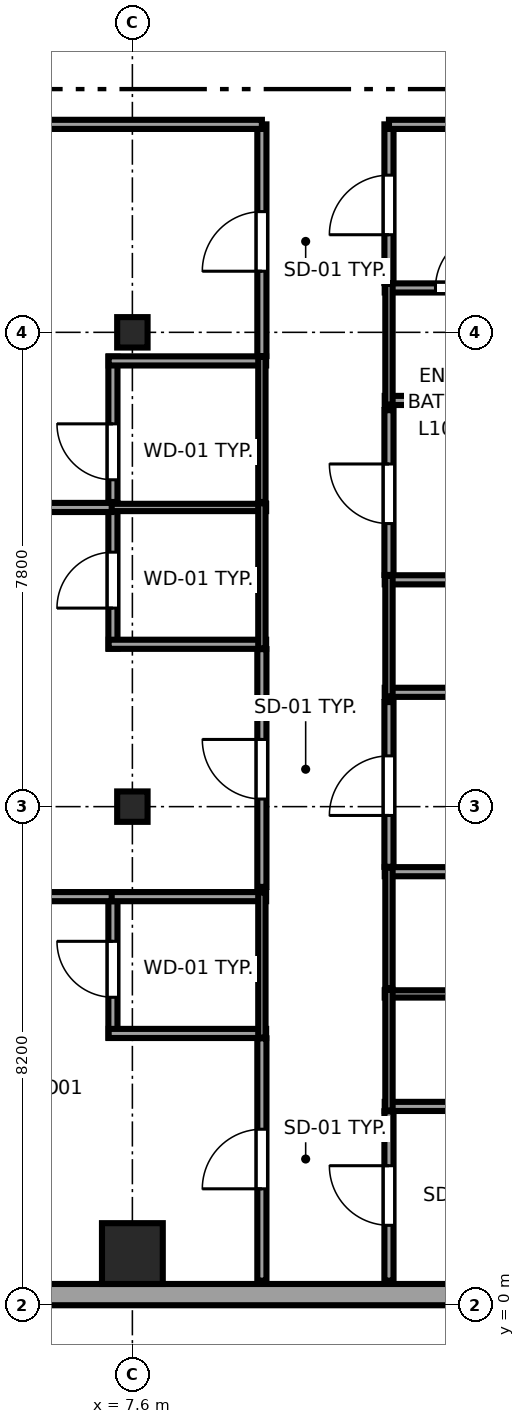
"""IFC4 building model, lengths in metres.
Left out: names, types, materials, properties, quantities, classifications, styles, units other than length and angle.
Written with IfcOpenShell. Run it as: python <this file> out.ifc"""

import sys

from ifc_helpers import new_model, si_unit, direction, frame, frame_2d, origin, origin_2d, place, context, subcontext, project, spatial, rectangle, i_section, extrude, source, transform, mapped, element, fill, save


model = new_model("IFC4")
c1 = context("Model", 3, precision=1e-05, world=origin(), true_north=direction((0.0, 1.0)))
c2 = subcontext(c1, "Body", "Model", "MODEL_VIEW")
j1 = project(units=[si_unit("LENGTHUNIT", "METRE"), si_unit("PLANEANGLEUNIT", "RADIAN")], contexts=[c1])
p1 = place(None, origin())
s1 = spatial("IfcSite", under=j1, at=p1, CompositionType="ELEMENT")
p2 = place(p1, origin())
s2 = spatial("IfcBuilding", under=s1, at=p2, CompositionType="ELEMENT")
p3 = place(p2, frame((0.0, 0.0, 46.2)))
s3 = spatial("IfcBuildingStorey", under=s2, at=p3, CompositionType="ELEMENT", Elevation=46.2)
m1 = source(origin(), c2, "Body", "SweptSolid", [
    extrude(rectangle(XDim=1.0, YDim=1.0, at=origin_2d()), origin(), (0.0, 0.0, 1.0), 3.55),
])
p4 = place(p3, frame((7.6, 0.85, 0.0), z_axis=(0.0, 0.0, 1.0), x_axis=(1.0, 0.0, 0.0)))
e1 = element("IfcColumn", 1, at=p4, inside=s3, PredefinedType="COLUMN", context=c2, shape_type="MappedRepresentation", body=[
    mapped(m1, transform((0.0, 0.0, 0.0), x_axis=(1.0, 0.0, 0.0), y_axis=(0.0, 1.0, 0.0), z_axis=(0.0, 0.0, 1.0), scale=1.0)),
])
m2 = source(origin(), c2, "Body", "SweptSolid", [
    extrude(i_section(OverallWidth=0.5, OverallDepth=0.5, WebThickness=0.028, FlangeThickness=0.045, at=origin_2d()), origin(), (0.0, 0.0, 1.0), 3.55),
])
for number, where, z_axis, x_axis in (
    (2, (7.6, 8.2, 0.0), (0.0, 0.0, 1.0), (1.0, 0.0, 0.0)),
    (3, (7.6, 16.0, 0.0), (0.0, 0.0, 1.0), (1.0, 0.0, 0.0)),
):
    element("IfcColumn", number, at=place(p3, frame(where, z_axis=z_axis, x_axis=x_axis)), inside=s3, PredefinedType="COLUMN", context=c2, shape_type="MappedRepresentation", body=[
        mapped(m2, transform((0.0, 0.0, 0.0), x_axis=(1.0, 0.0, 0.0), y_axis=(0.0, 1.0, 0.0), z_axis=(0.0, 0.0, 1.0), scale=1.0)),
    ])
p5 = place(p3, frame((4.617, 0.175, 0.0), z_axis=(0.0, 0.0, 1.0), x_axis=(1.0, 0.0, 0.0)))
e4 = element("IfcWall", 4, at=p5, inside=s3, PredefinedType="SOLIDWALL", context=c2, shape_type="SweptSolid", body=[
    extrude(rectangle(XDim=18.008, YDim=0.35, at=frame_2d((9.004, 0.0))), origin(), (0.0, 0.0, 1.0), 3.37),
])
p6 = place(p5, frame((14.332, 0.0, 0.68)))
e5 = element("IfcOpeningElement", 5, at=p6, cuts=e4, PredefinedType="OPENING", context=c2, shape_type="SweptSolid", body=[
    extrude(rectangle(XDim=1.95, YDim=1.82, at=frame_2d((0.975, 0.91))), frame((0.0, 0.185, 0.0), z_axis=(0.0, -1.0, 0.0), x_axis=(1.0, 0.0, 0.0)), (0.0, 0.0, 1.0), 0.37),
])
p7 = place(p3, frame((7.28, 4.4, 0.0), z_axis=(0.0, 0.0, 1.0), x_axis=(0.0, 1.0, 0.0)))
e6 = element("IfcWall", 6, at=p7, inside=s3, PredefinedType="PARTITIONING", context=c2, shape_type="SweptSolid", body=[
    extrude(rectangle(XDim=2.39, YDim=0.15, at=frame_2d((1.195, 0.0))), origin(), (0.0, 0.0, 1.0), 3.37),
])
p8 = place(p7, frame((0.665, 0.0, 0.0)))
e7 = element("IfcOpeningElement", 7, at=p8, cuts=e6, PredefinedType="OPENING", context=c2, shape_type="SweptSolid", body=[
    extrude(rectangle(XDim=0.92, YDim=2.01, at=frame_2d((0.46, 1.005))), frame((0.0, 0.085, 0.0), z_axis=(0.0, -1.0, 0.0), x_axis=(1.0, 0.0, 0.0)), (0.0, 0.0, 1.0), 0.17),
])
for number, where, z_axis, x_axis in (
    (8, (7.21, 4.47, 0.0), (0.0, 0.0, 1.0), (1.0, 0.0, 0.0)),
    (9, (7.21, 6.72, 0.0), (0.0, 0.0, 1.0), (1.0, 0.0, 0.0)),
):
    element("IfcWall", number, at=place(p3, frame(where, z_axis=z_axis, x_axis=x_axis)), inside=s3, PredefinedType="PARTITIONING", context=c2, shape_type="SweptSolid", body=[
        extrude(rectangle(XDim=2.59, YDim=0.15, at=frame_2d((1.295, 0.0))), origin(), (0.0, 0.0, 1.0), 3.37),
    ])
p9 = place(p3, frame((9.73, 4.4, 0.0), z_axis=(0.0, 0.0, 1.0), x_axis=(0.0, 1.0, 0.0)))
e10 = element("IfcWall", 10, at=p9, inside=s3, PredefinedType="PLUMBINGWALL", context=c2, shape_type="SweptSolid", body=[
    extrude(rectangle(XDim=2.39, YDim=0.12, at=frame_2d((1.195, 0.0))), origin(), (0.0, 0.0, 1.0), 3.37),
])
p10 = place(p3, frame((7.28, 10.8, 0.0), z_axis=(0.0, 0.0, 1.0), x_axis=(0.0, 1.0, 0.0)))
e11 = element("IfcWall", 11, at=p10, inside=s3, PredefinedType="PARTITIONING", context=c2, shape_type="SweptSolid", body=[
    extrude(rectangle(XDim=2.39, YDim=0.15, at=frame_2d((1.195, 0.0))), origin(), (0.0, 0.0, 1.0), 3.37),
])
p11 = place(p10, frame((0.665, 0.0, 0.0)))
e12 = element("IfcOpeningElement", 12, at=p11, cuts=e11, PredefinedType="OPENING", context=c2, shape_type="SweptSolid", body=[
    extrude(rectangle(XDim=0.92, YDim=2.01, at=frame_2d((0.46, 1.005))), frame((0.0, 0.085, 0.0), z_axis=(0.0, -1.0, 0.0), x_axis=(1.0, 0.0, 0.0)), (0.0, 0.0, 1.0), 0.17),
])
p12 = place(p3, frame((7.21, 10.87, 0.0), z_axis=(0.0, 0.0, 1.0), x_axis=(1.0, 0.0, 0.0)))
e13 = element("IfcWall", 13, at=p12, inside=s3, PredefinedType="PARTITIONING", context=c2, shape_type="SweptSolid", body=[
    extrude(rectangle(XDim=2.59, YDim=0.15, at=frame_2d((1.295, 0.0))), origin(), (0.0, 0.0, 1.0), 3.37),
])
p13 = place(p3, frame((7.21, 13.12, 0.0), z_axis=(0.0, 0.0, 1.0), x_axis=(1.0, 0.0, 0.0)))
e14 = element("IfcWall", 14, at=p13, inside=s3, PredefinedType="PLUMBINGWALL", context=c2, shape_type="SweptSolid", body=[
    extrude(rectangle(XDim=2.59, YDim=0.12, at=frame_2d((1.295, 0.0))), origin(), (0.0, 0.0, 1.0), 3.37),
])
p14 = place(p3, frame((9.73, 10.8, 0.0), z_axis=(0.0, 0.0, 1.0), x_axis=(0.0, 1.0, 0.0)))
e15 = element("IfcWall", 15, at=p14, inside=s3, PredefinedType="PLUMBINGWALL", context=c2, shape_type="SweptSolid", body=[
    extrude(rectangle(XDim=2.39, YDim=0.12, at=frame_2d((1.195, 0.0))), origin(), (0.0, 0.0, 1.0), 3.37),
])
p15 = place(p3, frame((7.28, 13.21, 0.0), z_axis=(0.0, 0.0, 1.0), x_axis=(0.0, 1.0, 0.0)))
e16 = element("IfcWall", 16, at=p15, inside=s3, PredefinedType="PARTITIONING", context=c2, shape_type="SweptSolid", body=[
    extrude(rectangle(XDim=2.39, YDim=0.15, at=frame_2d((1.195, 0.0))), origin(), (0.0, 0.0, 1.0), 3.37),
])
p16 = place(p15, frame((0.365, 0.0, 0.0)))
e17 = element("IfcOpeningElement", 17, at=p16, cuts=e16, PredefinedType="OPENING", context=c2, shape_type="SweptSolid", body=[
    extrude(rectangle(XDim=0.92, YDim=2.01, at=frame_2d((0.46, 1.005))), frame((0.0, 0.085, 0.0), z_axis=(0.0, -1.0, 0.0), x_axis=(1.0, 0.0, 0.0)), (0.0, 0.0, 1.0), 0.17),
])
p17 = place(p3, frame((7.21, 15.53, 0.0), z_axis=(0.0, 0.0, 1.0), x_axis=(1.0, 0.0, 0.0)))
e18 = element("IfcWall", 18, at=p17, inside=s3, PredefinedType="PARTITIONING", context=c2, shape_type="SweptSolid", body=[
    extrude(rectangle(XDim=2.59, YDim=0.15, at=frame_2d((1.295, 0.0))), origin(), (0.0, 0.0, 1.0), 3.37),
])
p18 = place(p3, frame((9.73, 13.21, 0.0), z_axis=(0.0, 0.0, 1.0), x_axis=(0.0, 1.0, 0.0)))
e19 = element("IfcWall", 19, at=p18, inside=s3, PredefinedType="PLUMBINGWALL", context=c2, shape_type="SweptSolid", body=[
    extrude(rectangle(XDim=2.39, YDim=0.12, at=frame_2d((1.195, 0.0))), origin(), (0.0, 0.0, 1.0), 3.37),
])
p19 = place(p3, frame((11.75, 3.27, 0.0), z_axis=(0.0, 0.0, 1.0), x_axis=(1.0, 0.0, 0.0)))
e20 = element("IfcWall", 20, at=p19, inside=s3, PredefinedType="PARTITIONING", context=c2, shape_type="SweptSolid", body=[
    extrude(rectangle(XDim=2.59, YDim=0.15, at=frame_2d((1.295, 0.0))), origin(), (0.0, 0.0, 1.0), 3.37),
])
p20 = place(p3, frame((11.75, 5.12, 0.0), z_axis=(0.0, 0.0, 1.0), x_axis=(1.0, 0.0, 0.0)))
e21 = element("IfcWall", 21, at=p20, inside=s3, PredefinedType="PLUMBINGWALL", context=c2, shape_type="SweptSolid", body=[
    extrude(rectangle(XDim=2.59, YDim=0.12, at=frame_2d((1.295, 0.0))), origin(), (0.0, 0.0, 1.0), 3.37),
])
p21 = place(p3, frame((11.82, 3.2, 0.0), z_axis=(0.0, 0.0, 1.0), x_axis=(0.0, 1.0, 0.0)))
e22 = element("IfcWall", 22, at=p21, inside=s3, PredefinedType="PLUMBINGWALL", context=c2, shape_type="SweptSolid", body=[
    extrude(rectangle(XDim=1.99, YDim=0.12, at=frame_2d((0.995, 0.0))), origin(), (0.0, 0.0, 1.0), 3.37),
])
p22 = place(p3, frame((11.75, 7.13, 0.0), z_axis=(0.0, 0.0, 1.0), x_axis=(1.0, 0.0, 0.0)))
e23 = element("IfcWall", 23, at=p22, inside=s3, PredefinedType="PARTITIONING", context=c2, shape_type="SweptSolid", body=[
    extrude(rectangle(XDim=2.59, YDim=0.15, at=frame_2d((1.295, 0.0))), origin(), (0.0, 0.0, 1.0), 3.37),
])
p23 = place(p3, frame((11.82, 5.21, 0.0), z_axis=(0.0, 0.0, 1.0), x_axis=(0.0, 1.0, 0.0)))
e24 = element("IfcWall", 24, at=p23, inside=s3, PredefinedType="PLUMBINGWALL", context=c2, shape_type="SweptSolid", body=[
    extrude(rectangle(XDim=1.99, YDim=0.12, at=frame_2d((0.995, 0.0))), origin(), (0.0, 0.0, 1.0), 3.37),
])
p24 = place(p3, frame((11.75, 10.08, 0.0), z_axis=(0.0, 0.0, 1.0), x_axis=(1.0, 0.0, 0.0)))
e25 = element("IfcWall", 25, at=p24, inside=s3, PredefinedType="PARTITIONING", context=c2, shape_type="SweptSolid", body=[
    extrude(rectangle(XDim=10.6, YDim=0.15, at=frame_2d((5.3, 0.0))), origin(), (0.0, 0.0, 1.0), 3.37),
])
p25 = place(p3, frame((11.75, 11.93, 0.0), z_axis=(0.0, 0.0, 1.0), x_axis=(1.0, 0.0, 0.0)))
e26 = element("IfcWall", 26, at=p25, inside=s3, PredefinedType="PARTITIONING", context=c2, shape_type="SweptSolid", body=[
    extrude(rectangle(XDim=2.59, YDim=0.15, at=frame_2d((1.295, 0.0))), origin(), (0.0, 0.0, 1.0), 3.37),
])
p26 = place(p3, frame((11.82, 10.01, 0.0), z_axis=(0.0, 0.0, 1.0), x_axis=(0.0, 1.0, 0.0)))
e27 = element("IfcWall", 27, at=p26, inside=s3, PredefinedType="PLUMBINGWALL", context=c2, shape_type="SweptSolid", body=[
    extrude(rectangle(XDim=1.99, YDim=0.12, at=frame_2d((0.995, 0.0))), origin(), (0.0, 0.0, 1.0), 3.37),
])
p27 = place(p3, frame((11.75, 14.88, 0.0), z_axis=(0.0, 0.0, 1.0), x_axis=(1.0, 0.0, 0.0)))
e28 = element("IfcWall", 28, at=p27, inside=s3, PredefinedType="PARTITIONING", context=c2, shape_type="SweptSolid", body=[
    extrude(rectangle(XDim=10.6, YDim=0.15, at=frame_2d((5.3, 0.0))), origin(), (0.0, 0.0, 1.0), 3.37),
])
p28 = place(p3, frame((11.75, 16.73, 0.0), z_axis=(0.0, 0.0, 1.0), x_axis=(1.0, 0.0, 0.0)))
e29 = element("IfcWall", 29, at=p28, inside=s3, PredefinedType="PARTITIONING", context=c2, shape_type="SweptSolid", body=[
    extrude(rectangle(XDim=2.59, YDim=0.15, at=frame_2d((1.295, 0.0))), origin(), (0.0, 0.0, 1.0), 3.37),
])
p29 = place(p28, frame((0.835, 0.0, 0.0)))
e30 = element("IfcOpeningElement", 30, at=p29, cuts=e29, PredefinedType="OPENING", context=c2, shape_type="SweptSolid", body=[
    extrude(rectangle(XDim=0.92, YDim=2.01, at=frame_2d((0.46, 1.005))), frame((0.0, 0.085, 0.0), z_axis=(0.0, -1.0, 0.0), x_axis=(1.0, 0.0, 0.0)), (0.0, 0.0, 1.0), 0.17),
])
p30 = place(p3, frame((11.82, 14.81, 0.0), z_axis=(0.0, 0.0, 1.0), x_axis=(0.0, 1.0, 0.0)))
e31 = element("IfcWall", 31, at=p30, inside=s3, PredefinedType="PLUMBINGWALL", context=c2, shape_type="SweptSolid", body=[
    extrude(rectangle(XDim=1.99, YDim=0.12, at=frame_2d((0.995, 0.0))), origin(), (0.0, 0.0, 1.0), 3.37),
])
p31 = place(p3, frame((9.73, 0.405, 0.0), z_axis=(0.0, 0.0, 1.0), x_axis=(0.0, 1.0, 0.0)))
e32 = element("IfcWall", 32, at=p31, inside=s3, PredefinedType="PARTITIONING", context=c2, shape_type="SweptSolid", body=[
    extrude(rectangle(XDim=3.985, YDim=0.15, at=frame_2d((1.992, 0.0))), origin(), (0.0, 0.0, 1.0), 3.37),
])
p32 = place(p31, frame((1.51, 0.0, 0.0)))
e33 = element("IfcOpeningElement", 33, at=p32, cuts=e32, PredefinedType="OPENING", context=c2, shape_type="SweptSolid", body=[
    extrude(rectangle(XDim=0.98, YDim=2.12, at=frame_2d((0.49, 1.06))), frame((0.0, 0.085, 0.0), z_axis=(0.0, -1.0, 0.0), x_axis=(1.0, 0.0, 0.0)), (0.0, 0.0, 1.0), 0.17),
])
p33 = place(p3, frame((0.405, 6.72, 0.0), z_axis=(0.0, 0.0, 1.0), x_axis=(1.0, 0.0, 0.0)))
e34 = element("IfcWall", 34, at=p33, inside=s3, PredefinedType="PARTITIONING", context=c2, shape_type="SweptSolid", body=[
    extrude(rectangle(XDim=6.855, YDim=0.15, at=frame_2d((3.427, 0.0))), origin(), (0.0, 0.0, 1.0), 3.37),
])
p34 = place(p3, frame((9.73, 6.88, 0.0), z_axis=(0.0, 0.0, 1.0), x_axis=(0.0, 1.0, 0.0)))
e35 = element("IfcWall", 35, at=p34, inside=s3, PredefinedType="PARTITIONING", context=c2, shape_type="SweptSolid", body=[
    extrude(rectangle(XDim=3.91, YDim=0.15, at=frame_2d((1.955, 0.0))), origin(), (0.0, 0.0, 1.0), 3.37),
])
p35 = place(p34, frame((1.445, 0.0, 0.0)))
e36 = element("IfcOpeningElement", 36, at=p35, cuts=e35, PredefinedType="OPENING", context=c2, shape_type="SweptSolid", body=[
    extrude(rectangle(XDim=0.98, YDim=2.12, at=frame_2d((0.49, 1.06))), frame((0.0, 0.085, 0.0), z_axis=(0.0, -1.0, 0.0), x_axis=(1.0, 0.0, 0.0)), (0.0, 0.0, 1.0), 0.17),
])
p36 = place(p3, frame((0.405, 13.12, 0.0), z_axis=(0.0, 0.0, 1.0), x_axis=(1.0, 0.0, 0.0)))
e37 = element("IfcWall", 37, at=p36, inside=s3, PredefinedType="PARTITIONING", context=c2, shape_type="SweptSolid", body=[
    extrude(rectangle(XDim=6.855, YDim=0.15, at=frame_2d((3.427, 0.0))), origin(), (0.0, 0.0, 1.0), 3.37),
])
p37 = place(p3, frame((9.73, 15.61, 0.0), z_axis=(0.0, 0.0, 1.0), x_axis=(0.0, 1.0, 0.0)))
e38 = element("IfcWall", 38, at=p37, inside=s3, PredefinedType="PARTITIONING", context=c2, shape_type="SweptSolid", body=[
    extrude(rectangle(XDim=3.81, YDim=0.15, at=frame_2d((1.905, 0.0))), origin(), (0.0, 0.0, 1.0), 3.37),
])
p38 = place(p37, frame((1.395, 0.0, 0.0)))
e39 = element("IfcOpeningElement", 39, at=p38, cuts=e38, PredefinedType="OPENING", context=c2, shape_type="SweptSolid", body=[
    extrude(rectangle(XDim=0.98, YDim=2.12, at=frame_2d((0.49, 1.06))), frame((0.0, 0.085, 0.0), z_axis=(0.0, -1.0, 0.0), x_axis=(1.0, 0.0, 0.0)), (0.0, 0.0, 1.0), 0.17),
])
p39 = place(p3, frame((0.405, 19.42, 0.0), z_axis=(0.0, 0.0, 1.0), x_axis=(1.0, 0.0, 0.0)))
e40 = element("IfcWall", 40, at=p39, inside=s3, PredefinedType="PARTITIONING", context=c2, shape_type="SweptSolid", body=[
    extrude(rectangle(XDim=9.325, YDim=0.15, at=frame_2d((4.663, 0.0))), origin(), (0.0, 0.0, 1.0), 3.37),
])
p40 = place(p3, frame((11.82, 0.405, 0.0), z_axis=(0.0, 0.0, 1.0), x_axis=(0.0, 1.0, 0.0)))
e41 = element("IfcWall", 41, at=p40, inside=s3, PredefinedType="PARTITIONING", context=c2, shape_type="SweptSolid", body=[
    extrude(rectangle(XDim=2.785, YDim=0.15, at=frame_2d((1.393, 0.0))), origin(), (0.0, 0.0, 1.0), 3.37),
])
p41 = place(p40, frame((0.91, 0.0, 0.0)))
e42 = element("IfcOpeningElement", 42, at=p41, cuts=e41, PredefinedType="OPENING", context=c2, shape_type="SweptSolid", body=[
    extrude(rectangle(XDim=0.98, YDim=2.12, at=frame_2d((0.49, 1.06))), frame((0.0, 0.085, 0.0), z_axis=(0.0, -1.0, 0.0), x_axis=(1.0, 0.0, 0.0)), (0.0, 0.0, 1.0), 0.17),
])
p42 = place(p3, frame((11.82, 7.21, 0.0), z_axis=(0.0, 0.0, 1.0), x_axis=(0.0, 1.0, 0.0)))
e43 = element("IfcWall", 43, at=p42, inside=s3, PredefinedType="PARTITIONING", context=c2, shape_type="SweptSolid", body=[
    extrude(rectangle(XDim=2.71, YDim=0.15, at=frame_2d((1.355, 0.0))), origin(), (0.0, 0.0, 1.0), 3.37),
])
p43 = place(p42, frame((0.845, 0.0, 0.0)))
e44 = element("IfcOpeningElement", 44, at=p43, cuts=e43, PredefinedType="OPENING", context=c2, shape_type="SweptSolid", body=[
    extrude(rectangle(XDim=0.98, YDim=2.12, at=frame_2d((0.49, 1.06))), frame((0.0, 0.085, 0.0), z_axis=(0.0, -1.0, 0.0), x_axis=(1.0, 0.0, 0.0)), (0.0, 0.0, 1.0), 0.17),
])
p44 = place(p3, frame((11.82, 12.01, 0.0), z_axis=(0.0, 0.0, 1.0), x_axis=(0.0, 1.0, 0.0)))
e45 = element("IfcWall", 45, at=p44, inside=s3, PredefinedType="PARTITIONING", context=c2, shape_type="SweptSolid", body=[
    extrude(rectangle(XDim=2.71, YDim=0.15, at=frame_2d((1.355, 0.0))), origin(), (0.0, 0.0, 1.0), 3.37),
])
p45 = place(p44, frame((0.845, 0.0, 0.0)))
e46 = element("IfcOpeningElement", 46, at=p45, cuts=e45, PredefinedType="OPENING", context=c2, shape_type="SweptSolid", body=[
    extrude(rectangle(XDim=0.98, YDim=2.12, at=frame_2d((0.49, 1.06))), frame((0.0, 0.085, 0.0), z_axis=(0.0, -1.0, 0.0), x_axis=(1.0, 0.0, 0.0)), (0.0, 0.0, 1.0), 0.17),
])
p46 = place(p3, frame((11.82, 16.81, 0.0), z_axis=(0.0, 0.0, 1.0), x_axis=(0.0, 1.0, 0.0)))
e47 = element("IfcWall", 47, at=p46, inside=s3, PredefinedType="PARTITIONING", context=c2, shape_type="SweptSolid", body=[
    extrude(rectangle(XDim=2.61, YDim=0.15, at=frame_2d((1.305, 0.0))), origin(), (0.0, 0.0, 1.0), 3.37),
])
p47 = place(p46, frame((0.795, 0.0, 0.0)))
e48 = element("IfcOpeningElement", 48, at=p47, cuts=e47, PredefinedType="OPENING", context=c2, shape_type="SweptSolid", body=[
    extrude(rectangle(XDim=0.98, YDim=2.12, at=frame_2d((0.49, 1.06))), frame((0.0, 0.085, 0.0), z_axis=(0.0, -1.0, 0.0), x_axis=(1.0, 0.0, 0.0)), (0.0, 0.0, 1.0), 0.17),
])
p48 = place(p3, frame((11.82, 19.42, 0.0), z_axis=(0.0, 0.0, 1.0), x_axis=(1.0, 0.0, 0.0)))
e49 = element("IfcWall", 49, at=p48, inside=s3, PredefinedType="PARTITIONING", context=c2, shape_type="SweptSolid", body=[
    extrude(rectangle(XDim=10.53, YDim=0.15, at=frame_2d((5.265, 0.0))), origin(), (0.0, 0.0, 1.0), 3.37),
])
m3 = source(origin(), c2, "Body", "SweptSolid", [
    extrude(rectangle(XDim=0.92, YDim=2.01, at=frame_2d((0.46, 1.005))), frame((0.0, 0.025, 0.0), z_axis=(0.0, -1.0, 0.0), x_axis=(1.0, 0.0, 0.0)), (0.0, 0.0, 1.0), 0.05),
])
p49 = place(p8, origin())
e50 = element("IfcDoor", 50, at=p49, inside=s3, OperationType="SINGLE_SWING_RIGHT", PredefinedType="DOOR", context=c2, shape_type="MappedRepresentation", body=[
    mapped(m3, transform((0.0, 0.0, 0.0), x_axis=(1.0, 0.0, 0.0), y_axis=(0.0, 1.0, 0.0), z_axis=(0.0, 0.0, 1.0), scale=1.0)),
])
fill(e7, e50)
p50 = place(p11, origin())
e51 = element("IfcDoor", 51, at=p50, inside=s3, OperationType="SINGLE_SWING_LEFT", PredefinedType="DOOR", context=c2, shape_type="MappedRepresentation", body=[
    mapped(m3, transform((0.0, 0.0, 0.0), x_axis=(1.0, 0.0, 0.0), y_axis=(0.0, 1.0, 0.0), z_axis=(0.0, 0.0, 1.0), scale=1.0)),
])
fill(e12, e51)
p51 = place(p16, origin())
e52 = element("IfcDoor", 52, at=p51, inside=s3, OperationType="SINGLE_SWING_RIGHT", PredefinedType="DOOR", context=c2, shape_type="MappedRepresentation", body=[
    mapped(m3, transform((0.0, 0.0, 0.0), x_axis=(1.0, 0.0, 0.0), y_axis=(0.0, 1.0, 0.0), z_axis=(0.0, 0.0, 1.0), scale=1.0)),
])
fill(e17, e52)
p52 = place(p29, origin())
e53 = element("IfcDoor", 53, at=p52, inside=s3, OperationType="SINGLE_SWING_RIGHT", PredefinedType="DOOR", context=c2, shape_type="MappedRepresentation", body=[
    mapped(m3, transform((0.0, 0.0, 0.0), x_axis=(1.0, 0.0, 0.0), y_axis=(0.0, 1.0, 0.0), z_axis=(0.0, 0.0, 1.0), scale=1.0)),
])
fill(e30, e53)
m4 = source(origin(), c2, "Body", "SweptSolid", [
    extrude(rectangle(XDim=0.98, YDim=2.12, at=frame_2d((0.49, 1.06))), frame((0.0, 0.025, 0.0), z_axis=(0.0, -1.0, 0.0), x_axis=(1.0, 0.0, 0.0)), (0.0, 0.0, 1.0), 0.05),
])
p53 = place(p32, origin())
e54 = element("IfcDoor", 54, at=p53, inside=s3, OperationType="SINGLE_SWING_LEFT", PredefinedType="DOOR", context=c2, shape_type="MappedRepresentation", body=[
    mapped(m4, transform((0.0, 0.0, 0.0), x_axis=(1.0, 0.0, 0.0), y_axis=(0.0, 1.0, 0.0), z_axis=(0.0, 0.0, 1.0), scale=1.0)),
])
fill(e33, e54)
p54 = place(p35, origin())
e55 = element("IfcDoor", 55, at=p54, inside=s3, OperationType="SINGLE_SWING_RIGHT", PredefinedType="DOOR", context=c2, shape_type="MappedRepresentation", body=[
    mapped(m4, transform((0.0, 0.0, 0.0), x_axis=(1.0, 0.0, 0.0), y_axis=(0.0, 1.0, 0.0), z_axis=(0.0, 0.0, 1.0), scale=1.0)),
])
fill(e36, e55)
p55 = place(p38, origin())
e56 = element("IfcDoor", 56, at=p55, inside=s3, OperationType="SINGLE_SWING_LEFT", PredefinedType="DOOR", context=c2, shape_type="MappedRepresentation", body=[
    mapped(m4, transform((0.0, 0.0, 0.0), x_axis=(1.0, 0.0, 0.0), y_axis=(0.0, 1.0, 0.0), z_axis=(0.0, 0.0, 1.0), scale=1.0)),
])
fill(e39, e56)
p56 = place(p41, origin())
e57 = element("IfcDoor", 57, at=p56, inside=s3, OperationType="SINGLE_SWING_RIGHT", PredefinedType="DOOR", context=c2, shape_type="MappedRepresentation", body=[
    mapped(m4, transform((0.0, 0.0, 0.0), x_axis=(1.0, 0.0, 0.0), y_axis=(0.0, 1.0, 0.0), z_axis=(0.0, 0.0, 1.0), scale=1.0)),
])
fill(e42, e57)
p57 = place(p43, origin())
e58 = element("IfcDoor", 58, at=p57, inside=s3, OperationType="SINGLE_SWING_LEFT", PredefinedType="DOOR", context=c2, shape_type="MappedRepresentation", body=[
    mapped(m4, transform((0.0, 0.0, 0.0), x_axis=(1.0, 0.0, 0.0), y_axis=(0.0, 1.0, 0.0), z_axis=(0.0, 0.0, 1.0), scale=1.0)),
])
fill(e44, e58)
p58 = place(p45, origin())
e59 = element("IfcDoor", 59, at=p58, inside=s3, OperationType="SINGLE_SWING_RIGHT", PredefinedType="DOOR", context=c2, shape_type="MappedRepresentation", body=[
    mapped(m4, transform((0.0, 0.0, 0.0), x_axis=(1.0, 0.0, 0.0), y_axis=(0.0, 1.0, 0.0), z_axis=(0.0, 0.0, 1.0), scale=1.0)),
])
fill(e46, e59)
p59 = place(p47, origin())
e60 = element("IfcDoor", 60, at=p59, inside=s3, OperationType="SINGLE_SWING_LEFT", PredefinedType="DOOR", context=c2, shape_type="MappedRepresentation", body=[
    mapped(m4, transform((0.0, 0.0, 0.0), x_axis=(1.0, 0.0, 0.0), y_axis=(0.0, 1.0, 0.0), z_axis=(0.0, 0.0, 1.0), scale=1.0)),
])
fill(e48, e60)
save(model, sys.argv[1])
